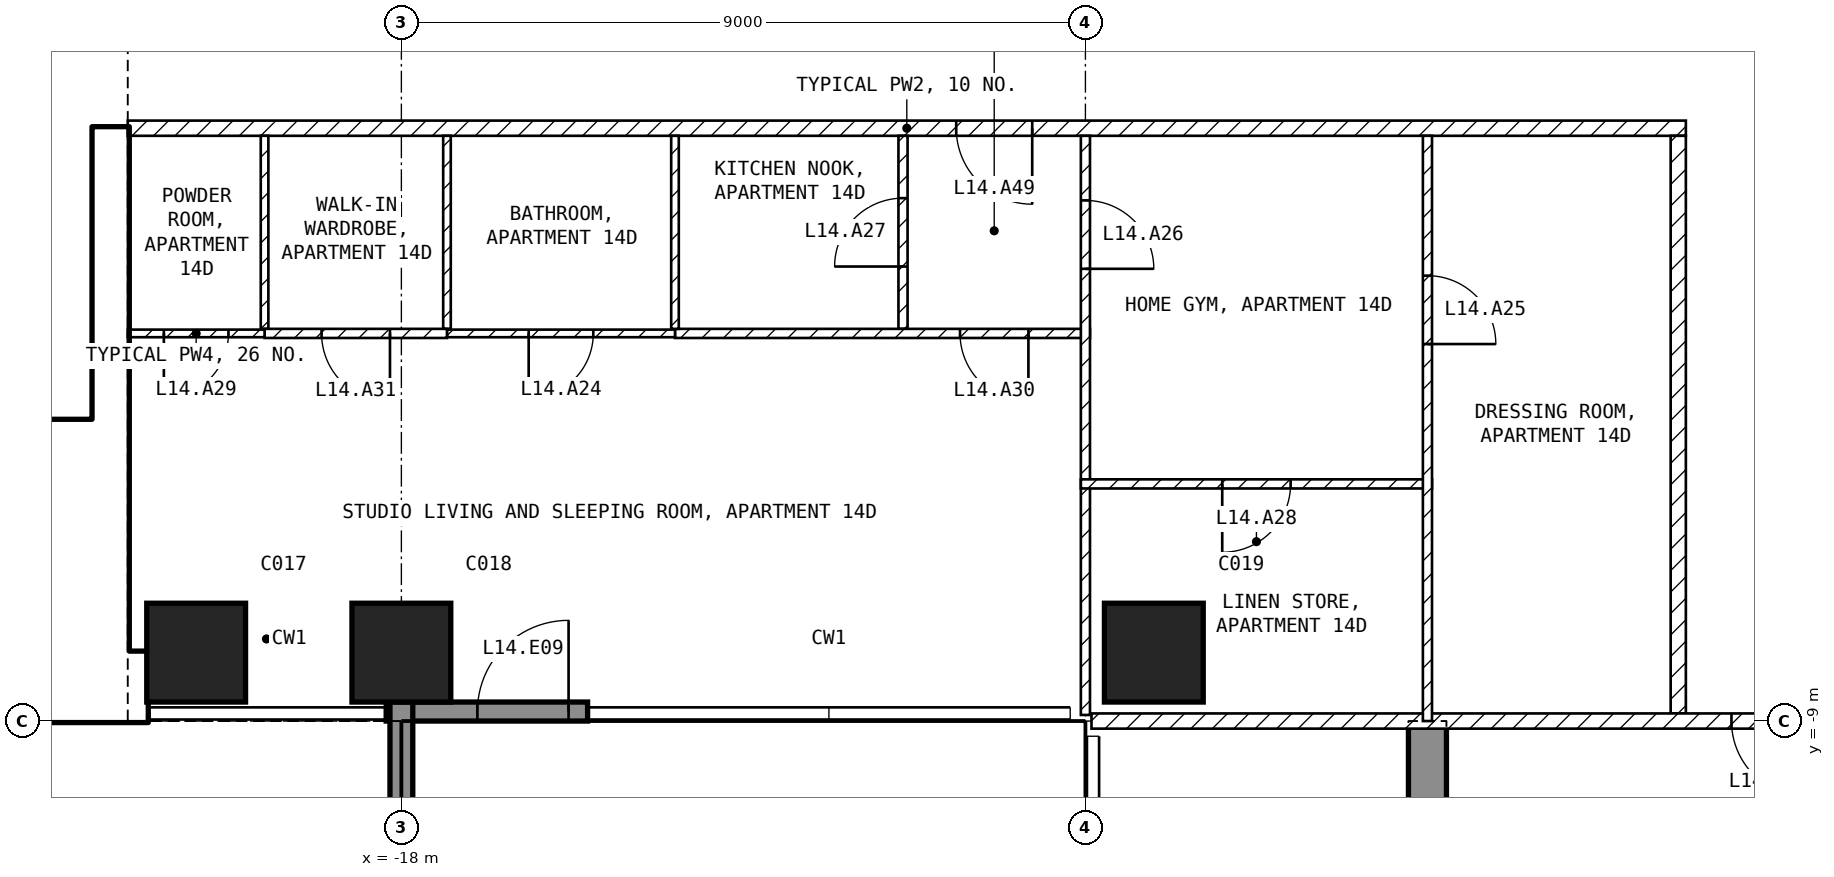
"""IFC4 building model, lengths in metres.
Left out: names, types, materials, properties, quantities, classifications, styles, units other than length and angle.
Written with IfcOpenShell. Run it as: python <this file> out.ifc"""

import sys

from ifc_helpers import new_model, si_unit, direction, frame, frame_2d, origin, origin_2d, place, context, subcontext, project, spatial, polyline, rectangle, outline, extrude, element, fill, save


model = new_model("IFC4")
c1 = context("Model", 3, precision=1e-05, world=origin(), true_north=direction((0.0, 1.0)))
c2 = subcontext(c1, "Body", "Model", "MODEL_VIEW")
j1 = project(units=[si_unit("LENGTHUNIT", "METRE"), si_unit("PLANEANGLEUNIT", "RADIAN")], contexts=[c1])
p1 = place(None, origin())
s1 = spatial("IfcSite", under=j1, at=p1, CompositionType="ELEMENT")
p2 = place(p1, origin())
s2 = spatial("IfcBuilding", under=s1, at=p2, CompositionType="ELEMENT")
p3 = place(p2, frame((0.0, 0.0, 68.0)))
s3 = spatial("IfcBuildingStorey", under=s2, at=p3, CompositionType="ELEMENT", Elevation=68.0)
for number, where, z_axis, x_axis in (
    (1, (-20.7, -8.1, -0.25), (0.0, 0.0, 1.0), (1.0, 0.0, 0.0)),
    (2, (-18.0, -8.1, -0.25), (0.0, 0.0, 1.0), (1.0, 0.0, 0.0)),
    (3, (-8.1, -8.1, -0.25), (0.0, 0.0, 1.0), (1.0, 0.0, 0.0)),
):
    element("IfcColumn", number, at=place(p3, frame(where, z_axis=z_axis, x_axis=x_axis)), inside=s3, PredefinedType="COLUMN", context=c2, shape_type="SweptSolid", body=[
        extrude(rectangle(XDim=1.3, YDim=1.3, at=origin_2d()), origin(), (0.0, 0.0, 1.0), 3.5),
    ])
p4 = place(p3, frame((-4.75, -25.45, -0.25), z_axis=(1.0, 0.0, 0.0), x_axis=(0.0, 1.0, 0.0)))
e4 = element("IfcWall", 4, at=p4, inside=s3, PredefinedType="SHEAR", context=c2, shape_type="SweptSolid", body=[
    extrude(outline(polyline([(0.0, 0.0), (4.15, 0.0), (4.15, 2.65), (6.55, 2.65), (6.55, 0.0), (11.95, 0.0), (11.95, 2.65), (14.35, 2.65), (14.35, 0.0), (16.45, 0.0), (16.45, 3.5), (0.0, 3.5), (0.0, 0.0)])), origin(), (0.0, 0.0, 1.0), 0.5),
])
p5 = place(p3, frame((-18.2, -8.875, 0.0), z_axis=(0.0, 0.0, 1.0), x_axis=(1.0, 0.0, 0.0)))
e5 = element("IfcWall", 5, at=p5, inside=s3, PredefinedType="SOLIDWALL", context=c2, shape_type="SweptSolid", body=[
    extrude(rectangle(XDim=2.65, YDim=0.25, at=frame_2d((1.325, 0.0))), origin(), (0.0, 0.0, 1.0), 3.25),
])
p6 = place(p5, frame((1.2, 0.0, 0.0)))
e6 = element("IfcOpeningElement", 6, at=p6, cuts=e5, PredefinedType="OPENING", context=c2, shape_type="SweptSolid", body=[
    extrude(rectangle(XDim=1.2, YDim=2.4, at=frame_2d((0.6, 1.2))), frame((0.0, 0.135, 0.0), z_axis=(0.0, -1.0, 0.0), x_axis=(1.0, 0.0, 0.0)), (0.0, 0.0, 1.0), 0.27),
])
p7 = place(p3, frame((-18.0, -8.75, 0.0), z_axis=(0.0, 0.0, 1.0), x_axis=(0.0, -1.0, 0.0)))
e7 = element("IfcWall", 7, at=p7, inside=s3, PredefinedType="SOLIDWALL", context=c2, shape_type="SweptSolid", body=[
    extrude(rectangle(XDim=2.95, YDim=0.3, at=frame_2d((1.475, 0.0))), origin(), (0.0, 0.0, 1.0), 3.25),
])
p8 = place(p3, frame((-32.4, -8.55, 0.0), z_axis=(0.0, 0.0, 1.0), x_axis=(1.0, 0.0, 0.0)))
e8 = element("IfcWall", 8, at=p8, inside=s3, PredefinedType="SHEAR", context=c2, shape_type="SweptSolid", body=[
    extrude(rectangle(XDim=11.05, YDim=0.9, at=frame_2d((5.525, 0.0))), origin(), (0.0, 0.0, 1.0), 3.25),
])
p9 = place(p3, frame((-21.825, -8.1, 0.0), z_axis=(0.0, 0.0, 1.0), x_axis=(0.0, 1.0, 0.0)))
e9 = element("IfcWall", 9, at=p9, inside=s3, PredefinedType="SHEAR", context=c2, shape_type="SweptSolid", body=[
    extrude(rectangle(XDim=6.9, YDim=0.45, at=frame_2d((3.45, 0.0))), origin(), (0.0, 0.0, 1.0), 3.25),
])
p10 = place(p3, frame((-28.35, -5.15, 0.0), z_axis=(0.0, 0.0, 1.0), x_axis=(1.0, 0.0, 0.0)))
e10 = element("IfcWall", 10, at=p10, inside=s3, PredefinedType="SOLIDWALL", context=c2, shape_type="SweptSolid", body=[
    extrude(rectangle(XDim=6.3, YDim=0.2, at=frame_2d((3.15, 0.0))), origin(), (0.0, 0.0, 1.0), 3.25),
])
p11 = place(p10, frame((5.1, 0.0, 0.0)))
e11 = element("IfcOpeningElement", 11, at=p11, cuts=e10, PredefinedType="OPENING", context=c2, shape_type="SweptSolid", body=[
    extrude(rectangle(XDim=1.0, YDim=2.1, at=frame_2d((0.5, 1.05))), frame((0.0, 0.11, 0.0), z_axis=(0.0, -1.0, 0.0), x_axis=(1.0, 0.0, 0.0)), (0.0, 0.0, 1.0), 0.22),
])
p12 = place(p3, frame((-1.1, -1.2, 0.0), z_axis=(0.0, 0.0, 1.0), x_axis=(-1.0, 0.0, 0.0)))
e12 = element("IfcWall", 12, at=p12, inside=s3, PredefinedType="PARTITIONING", context=c2, shape_type="SweptSolid", body=[
    extrude(rectangle(XDim=20.5, YDim=0.2, at=frame_2d((10.25, 0.0))), origin(), (0.0, 0.0, 1.0), 3.25),
])
p13 = place(p12, frame((8.6, 0.0, 0.0)))
e13 = element("IfcOpeningElement", 13, at=p13, cuts=e12, PredefinedType="OPENING", context=c2, shape_type="SweptSolid", body=[
    extrude(rectangle(XDim=1.0, YDim=2.1, at=frame_2d((0.5, 1.05))), frame((0.0, 0.11, 0.0), z_axis=(0.0, -1.0, 0.0), x_axis=(1.0, 0.0, 0.0)), (0.0, 0.0, 1.0), 0.22),
])
p14 = place(p3, frame((-1.2, -8.9, 0.0), z_axis=(0.0, 0.0, 1.0), x_axis=(0.0, 1.0, 0.0)))
e14 = element("IfcWall", 14, at=p14, inside=s3, PredefinedType="PARTITIONING", context=c2, shape_type="SweptSolid", body=[
    extrude(rectangle(XDim=7.6, YDim=0.2, at=frame_2d((3.8, 0.0))), origin(), (0.0, 0.0, 1.0), 3.25),
])
p15 = place(p3, frame((8.92, -9.0, 0.0), z_axis=(0.0, 0.0, 1.0), x_axis=(-1.0, 0.0, 0.0)))
e15 = element("IfcWall", 15, at=p15, inside=s3, PredefinedType="PARTITIONING", context=c2, shape_type="SweptSolid", body=[
    extrude(rectangle(XDim=17.84, YDim=0.2, at=frame_2d((8.92, 0.0))), origin(), (0.0, 0.0, 1.0), 3.25),
])
p16 = place(p15, frame((8.42, 0.0, 0.0)))
e16 = element("IfcOpeningElement", 16, at=p16, cuts=e15, PredefinedType="OPENING", context=c2, shape_type="SweptSolid", body=[
    extrude(rectangle(XDim=1.0, YDim=2.1, at=frame_2d((0.5, 1.05))), frame((0.0, 0.11, 0.0), z_axis=(0.0, -1.0, 0.0), x_axis=(1.0, 0.0, 0.0)), (0.0, 0.0, 1.0), 0.22),
])
p17 = place(p3, frame((-11.4, -3.84, 0.0), z_axis=(0.0, 0.0, 1.0), x_axis=(0.0, 1.0, 0.0)))
e17 = element("IfcWall", 17, at=p17, inside=s3, PredefinedType="PARTITIONING", context=c2, shape_type="SweptSolid", body=[
    extrude(rectangle(XDim=2.54, YDim=0.12, at=frame_2d((1.27, 0.0))), origin(), (0.0, 0.0, 1.0), 3.25),
])
p18 = place(p17, frame((0.82, 0.0, 0.0)))
e18 = element("IfcOpeningElement", 18, at=p18, cuts=e17, PredefinedType="OPENING", context=c2, shape_type="SweptSolid", body=[
    extrude(rectangle(XDim=0.9, YDim=2.1, at=frame_2d((0.45, 1.05))), frame((0.0, 0.07, 0.0), z_axis=(0.0, -1.0, 0.0), x_axis=(1.0, 0.0, 0.0)), (0.0, 0.0, 1.0), 0.14),
])
p19 = place(p3, frame((-8.94, -3.9, 0.0), z_axis=(0.0, 0.0, 1.0), x_axis=(-1.0, 0.0, 0.0)))
e19 = element("IfcWall", 19, at=p19, inside=s3, PredefinedType="PARTITIONING", context=c2, shape_type="SweptSolid", body=[
    extrude(rectangle(XDim=5.46, YDim=0.12, at=frame_2d((2.73, 0.0))), origin(), (0.0, 0.0, 1.0), 3.25),
])
p20 = place(p19, frame((0.81, 0.0, 0.0)))
e20 = element("IfcOpeningElement", 20, at=p20, cuts=e19, PredefinedType="OPENING", context=c2, shape_type="SweptSolid", body=[
    extrude(rectangle(XDim=0.9, YDim=2.1, at=frame_2d((0.45, 1.05))), frame((0.0, 0.07, 0.0), z_axis=(0.0, -1.0, 0.0), x_axis=(1.0, 0.0, 0.0)), (0.0, 0.0, 1.0), 0.14),
])
p21 = place(p3, frame((-9.0, -1.3, 0.0), z_axis=(0.0, 0.0, 1.0), x_axis=(0.0, -1.0, 0.0)))
e21 = element("IfcWall", 21, at=p21, inside=s3, PredefinedType="PARTITIONING", context=c2, shape_type="SweptSolid", body=[
    extrude(rectangle(XDim=7.62, YDim=0.12, at=frame_2d((3.81, 0.0))), origin(), (0.0, 0.0, 1.0), 3.25),
])
p22 = place(p21, frame((0.85, 0.0, 0.0)))
e22 = element("IfcOpeningElement", 22, at=p22, cuts=e21, PredefinedType="OPENING", context=c2, shape_type="SweptSolid", body=[
    extrude(rectangle(XDim=0.9, YDim=2.1, at=frame_2d((0.45, 1.05))), frame((0.0, 0.07, 0.0), z_axis=(0.0, -1.0, 0.0), x_axis=(1.0, 0.0, 0.0)), (0.0, 0.0, 1.0), 0.14),
])
for number, where, z_axis, x_axis in (
    (23, (-14.4, -3.84, 0.0), (0.0, 0.0, 1.0), (0.0, 1.0, 0.0)),
    (24, (-17.4, -3.84, 0.0), (0.0, 0.0, 1.0), (0.0, 1.0, 0.0)),
):
    element("IfcWall", number, at=place(p3, frame(where, z_axis=z_axis, x_axis=x_axis)), inside=s3, PredefinedType="PARTITIONING", context=c2, shape_type="SweptSolid", body=[
        extrude(rectangle(XDim=2.54, YDim=0.1, at=frame_2d((1.27, 0.0))), origin(), (0.0, 0.0, 1.0), 3.25),
    ])
p23 = place(p3, frame((-14.4, -3.9, 0.0), z_axis=(0.0, 0.0, 1.0), x_axis=(-1.0, 0.0, 0.0)))
e25 = element("IfcWall", 25, at=p23, inside=s3, PredefinedType="PARTITIONING", context=c2, shape_type="SweptSolid", body=[
    extrude(rectangle(XDim=3.0, YDim=0.1, at=frame_2d((1.5, 0.0))), origin(), (0.0, 0.0, 1.0), 3.25),
])
p24 = place(p23, frame((1.075, 0.0, 0.0)))
e26 = element("IfcOpeningElement", 26, at=p24, cuts=e25, PredefinedType="OPENING", context=c2, shape_type="SweptSolid", body=[
    extrude(rectangle(XDim=0.85, YDim=2.1, at=frame_2d((0.425, 1.05))), frame((0.0, 0.06, 0.0), z_axis=(0.0, -1.0, 0.0), x_axis=(1.0, 0.0, 0.0)), (0.0, 0.0, 1.0), 0.12),
])
p25 = place(p3, frame((-19.8, -3.84, 0.0), z_axis=(0.0, 0.0, 1.0), x_axis=(0.0, 1.0, 0.0)))
e27 = element("IfcWall", 27, at=p25, inside=s3, PredefinedType="PARTITIONING", context=c2, shape_type="SweptSolid", body=[
    extrude(rectangle(XDim=2.54, YDim=0.1, at=frame_2d((1.27, 0.0))), origin(), (0.0, 0.0, 1.0), 3.25),
])
p26 = place(p3, frame((-17.4, -3.9, 0.0), z_axis=(0.0, 0.0, 1.0), x_axis=(-1.0, 0.0, 0.0)))
e28 = element("IfcWall", 28, at=p26, inside=s3, PredefinedType="PARTITIONING", context=c2, shape_type="SweptSolid", body=[
    extrude(rectangle(XDim=2.4, YDim=0.12, at=frame_2d((1.2, 0.0))), origin(), (0.0, 0.0, 1.0), 3.25),
])
p27 = place(p26, frame((0.75, 0.0, 0.0)))
e29 = element("IfcOpeningElement", 29, at=p27, cuts=e28, PredefinedType="OPENING", context=c2, shape_type="SweptSolid", body=[
    extrude(rectangle(XDim=0.9, YDim=2.1, at=frame_2d((0.45, 1.05))), frame((0.0, 0.07, 0.0), z_axis=(0.0, -1.0, 0.0), x_axis=(1.0, 0.0, 0.0)), (0.0, 0.0, 1.0), 0.14),
])
p28 = place(p3, frame((-19.8, -3.9, 0.0), z_axis=(0.0, 0.0, 1.0), x_axis=(-1.0, 0.0, 0.0)))
e30 = element("IfcWall", 30, at=p28, inside=s3, PredefinedType="PARTITIONING", context=c2, shape_type="SweptSolid", body=[
    extrude(rectangle(XDim=1.8, YDim=0.1, at=frame_2d((0.9, 0.0))), origin(), (0.0, 0.0, 1.0), 3.25),
])
p29 = place(p28, frame((0.475, 0.0, 0.0)))
e31 = element("IfcOpeningElement", 31, at=p29, cuts=e30, PredefinedType="OPENING", context=c2, shape_type="SweptSolid", body=[
    extrude(rectangle(XDim=0.85, YDim=2.1, at=frame_2d((0.425, 1.05))), frame((0.0, 0.06, 0.0), z_axis=(0.0, -1.0, 0.0), x_axis=(1.0, 0.0, 0.0)), (0.0, 0.0, 1.0), 0.12),
])
p30 = place(p3, frame((-4.44, -5.88, 0.0), z_axis=(0.0, 0.0, 1.0), x_axis=(-1.0, 0.0, 0.0)))
e32 = element("IfcWall", 32, at=p30, inside=s3, PredefinedType="PARTITIONING", context=c2, shape_type="SweptSolid", body=[
    extrude(rectangle(XDim=4.62, YDim=0.12, at=frame_2d((2.31, 0.0))), origin(), (0.0, 0.0, 1.0), 3.25),
])
p31 = place(p30, frame((1.86, 0.0, 0.0)))
e33 = element("IfcOpeningElement", 33, at=p31, cuts=e32, PredefinedType="OPENING", context=c2, shape_type="SweptSolid", body=[
    extrude(rectangle(XDim=0.9, YDim=2.1, at=frame_2d((0.45, 1.05))), frame((0.0, 0.07, 0.0), z_axis=(0.0, -1.0, 0.0), x_axis=(1.0, 0.0, 0.0)), (0.0, 0.0, 1.0), 0.14),
])
p32 = place(p3, frame((-4.5, -1.3, 0.0), z_axis=(0.0, 0.0, 1.0), x_axis=(0.0, -1.0, 0.0)))
e34 = element("IfcWall", 34, at=p32, inside=s3, PredefinedType="PARTITIONING", context=c2, shape_type="SweptSolid", body=[
    extrude(rectangle(XDim=7.7, YDim=0.12, at=frame_2d((3.85, 0.0))), origin(), (0.0, 0.0, 1.0), 3.25),
])
p33 = place(p32, frame((1.84, 0.0, 0.0)))
e35 = element("IfcOpeningElement", 35, at=p33, cuts=e34, PredefinedType="OPENING", context=c2, shape_type="SweptSolid", body=[
    extrude(rectangle(XDim=0.9, YDim=2.1, at=frame_2d((0.45, 1.05))), frame((0.0, 0.07, 0.0), z_axis=(0.0, -1.0, 0.0), x_axis=(1.0, 0.0, 0.0)), (0.0, 0.0, 1.0), 0.14),
])
p34 = place(p6, origin())
e36 = element("IfcDoor", 36, at=p34, inside=s3, OperationType="SINGLE_SWING_RIGHT", PredefinedType="DOOR", context=c2, shape_type="SweptSolid", body=[
    extrude(rectangle(XDim=1.2, YDim=2.4, at=frame_2d((0.6, 1.2))), frame((0.0, 0.025, 0.0), z_axis=(0.0, -1.0, 0.0), x_axis=(1.0, 0.0, 0.0)), (0.0, 0.0, 1.0), 0.05),
])
fill(e6, e36)
p35 = place(p11, origin())
e37 = element("IfcDoor", 37, at=p35, inside=s3, OperationType="SINGLE_SWING_LEFT", PredefinedType="DOOR", context=c2, shape_type="SweptSolid", body=[
    extrude(rectangle(XDim=1.0, YDim=2.1, at=frame_2d((0.5, 1.05))), frame((0.0, 0.025, 0.0), z_axis=(0.0, -1.0, 0.0), x_axis=(1.0, 0.0, 0.0)), (0.0, 0.0, 1.0), 0.05),
])
fill(e11, e37)
p36 = place(p24, origin())
e38 = element("IfcDoor", 38, at=p36, inside=s3, OperationType="SINGLE_SWING_RIGHT", PredefinedType="DOOR", context=c2, shape_type="SweptSolid", body=[
    extrude(rectangle(XDim=0.85, YDim=2.1, at=frame_2d((0.425, 1.05))), frame((0.0, 0.025, 0.0), z_axis=(0.0, -1.0, 0.0), x_axis=(1.0, 0.0, 0.0)), (0.0, 0.0, 1.0), 0.05),
])
fill(e26, e38)
p37 = place(p33, origin())
e39 = element("IfcDoor", 39, at=p37, inside=s3, OperationType="SINGLE_SWING_RIGHT", PredefinedType="DOOR", context=c2, shape_type="SweptSolid", body=[
    extrude(rectangle(XDim=0.9, YDim=2.1, at=frame_2d((0.45, 1.05))), frame((0.0, 0.025, 0.0), z_axis=(0.0, -1.0, 0.0), x_axis=(1.0, 0.0, 0.0)), (0.0, 0.0, 1.0), 0.05),
])
fill(e35, e39)
p38 = place(p22, origin())
e40 = element("IfcDoor", 40, at=p38, inside=s3, OperationType="SINGLE_SWING_RIGHT", PredefinedType="DOOR", context=c2, shape_type="SweptSolid", body=[
    extrude(rectangle(XDim=0.9, YDim=2.1, at=frame_2d((0.45, 1.05))), frame((0.0, 0.025, 0.0), z_axis=(0.0, -1.0, 0.0), x_axis=(1.0, 0.0, 0.0)), (0.0, 0.0, 1.0), 0.05),
])
fill(e22, e40)
p39 = place(p18, origin())
e41 = element("IfcDoor", 41, at=p39, inside=s3, OperationType="SINGLE_SWING_LEFT", PredefinedType="DOOR", context=c2, shape_type="SweptSolid", body=[
    extrude(rectangle(XDim=0.9, YDim=2.1, at=frame_2d((0.45, 1.05))), frame((0.0, 0.025, 0.0), z_axis=(0.0, -1.0, 0.0), x_axis=(1.0, 0.0, 0.0)), (0.0, 0.0, 1.0), 0.05),
])
fill(e18, e41)
p40 = place(p31, origin())
e42 = element("IfcDoor", 42, at=p40, inside=s3, OperationType="SINGLE_SWING_RIGHT", PredefinedType="DOOR", context=c2, shape_type="SweptSolid", body=[
    extrude(rectangle(XDim=0.9, YDim=2.1, at=frame_2d((0.45, 1.05))), frame((0.0, 0.025, 0.0), z_axis=(0.0, -1.0, 0.0), x_axis=(1.0, 0.0, 0.0)), (0.0, 0.0, 1.0), 0.05),
])
fill(e33, e42)
p41 = place(p29, origin())
e43 = element("IfcDoor", 43, at=p41, inside=s3, OperationType="SINGLE_SWING_RIGHT", PredefinedType="DOOR", context=c2, shape_type="SweptSolid", body=[
    extrude(rectangle(XDim=0.85, YDim=2.1, at=frame_2d((0.425, 1.05))), frame((0.0, 0.025, 0.0), z_axis=(0.0, -1.0, 0.0), x_axis=(1.0, 0.0, 0.0)), (0.0, 0.0, 1.0), 0.05),
])
fill(e31, e43)
p42 = place(p20, origin())
e44 = element("IfcDoor", 44, at=p42, inside=s3, OperationType="SINGLE_SWING_LEFT", PredefinedType="DOOR", context=c2, shape_type="SweptSolid", body=[
    extrude(rectangle(XDim=0.9, YDim=2.1, at=frame_2d((0.45, 1.05))), frame((0.0, 0.025, 0.0), z_axis=(0.0, -1.0, 0.0), x_axis=(1.0, 0.0, 0.0)), (0.0, 0.0, 1.0), 0.05),
])
fill(e20, e44)
p43 = place(p27, origin())
e45 = element("IfcDoor", 45, at=p43, inside=s3, OperationType="SINGLE_SWING_LEFT", PredefinedType="DOOR", context=c2, shape_type="SweptSolid", body=[
    extrude(rectangle(XDim=0.9, YDim=2.1, at=frame_2d((0.45, 1.05))), frame((0.0, 0.025, 0.0), z_axis=(0.0, -1.0, 0.0), x_axis=(1.0, 0.0, 0.0)), (0.0, 0.0, 1.0), 0.05),
])
fill(e29, e45)
p44 = place(p16, origin())
e46 = element("IfcDoor", 46, at=p44, inside=s3, OperationType="SINGLE_SWING_LEFT", PredefinedType="DOOR", context=c2, shape_type="SweptSolid", body=[
    extrude(rectangle(XDim=1.0, YDim=2.1, at=frame_2d((0.5, 1.05))), frame((0.0, 0.025, 0.0), z_axis=(0.0, -1.0, 0.0), x_axis=(1.0, 0.0, 0.0)), (0.0, 0.0, 1.0), 0.05),
])
fill(e16, e46)
p45 = place(p13, origin())
e47 = element("IfcDoor", 47, at=p45, inside=s3, OperationType="SINGLE_SWING_LEFT", PredefinedType="DOOR", context=c2, shape_type="SweptSolid", body=[
    extrude(rectangle(XDim=1.0, YDim=2.1, at=frame_2d((0.5, 1.05))), frame((0.0, 0.025, 0.0), z_axis=(0.0, -1.0, 0.0), x_axis=(1.0, 0.0, 0.0)), (0.0, 0.0, 1.0), 0.05),
])
fill(e13, e47)
save(model, sys.argv[1])
